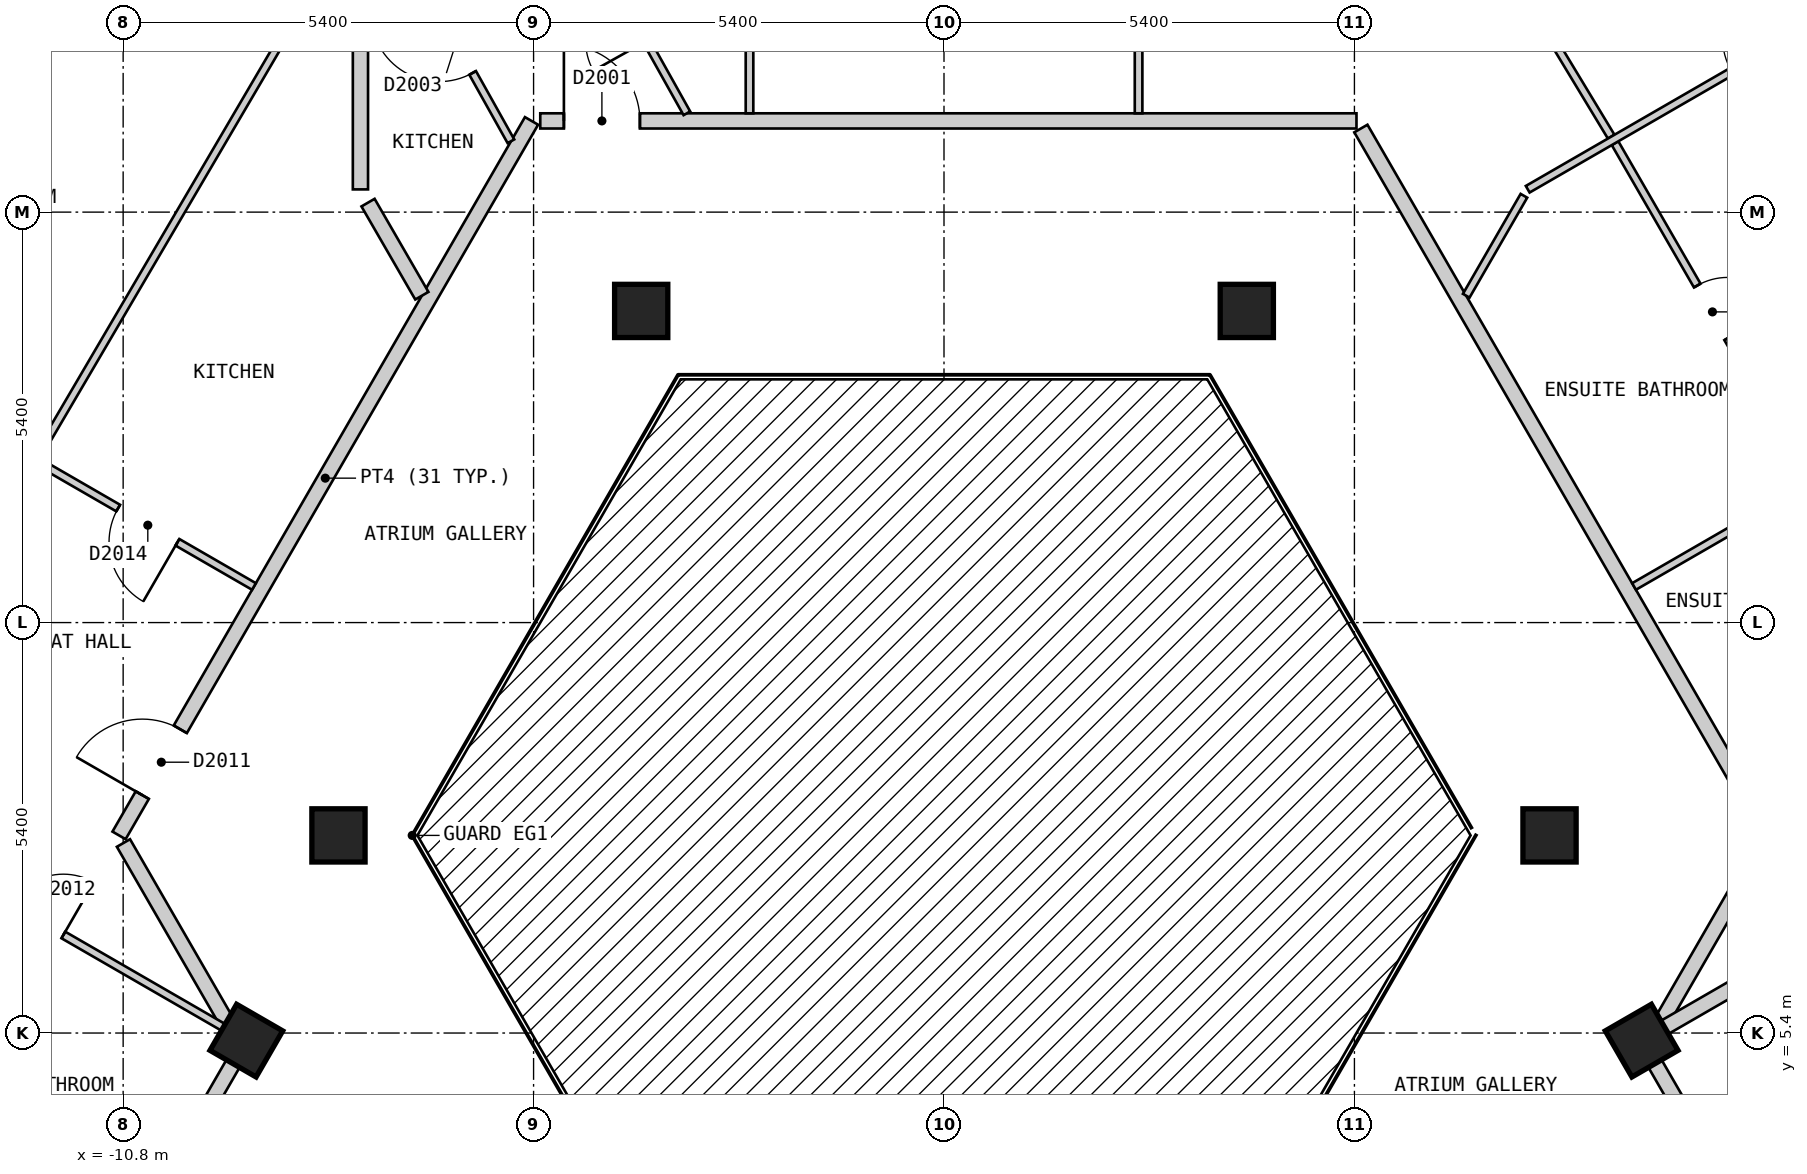
"""IFC4 building model, lengths in metres.
Left out: names, types, materials, properties, quantities, classifications, styles, units other than length and angle.
Written with IfcOpenShell. Run it as: python <this file> out.ifc"""

import sys

from ifc_helpers import new_model, si_unit, direction, frame, frame_2d, origin, origin_2d, place, context, subcontext, project, spatial, rectangle, extrude, element, fill, save


model = new_model("IFC4")
c1 = context("Model", 3, precision=1e-05, world=origin(), true_north=direction((0.0, 1.0)))
c2 = subcontext(c1, "Body", "Model", "MODEL_VIEW")
j1 = project(units=[si_unit("LENGTHUNIT", "METRE"), si_unit("PLANEANGLEUNIT", "RADIAN")], contexts=[c1])
p1 = place(None, origin())
s1 = spatial("IfcSite", under=j1, at=p1, CompositionType="ELEMENT")
p2 = place(p1, origin())
s2 = spatial("IfcBuilding", under=s1, at=p2, CompositionType="ELEMENT")
p3 = place(p2, frame((0.0, 0.0, 238.8)))
s3 = spatial("IfcBuildingStorey", under=s2, at=p3, CompositionType="ELEMENT", Elevation=238.8)
for number, where, z_axis, x_axis in (
    (1, (9.179, 5.3, 0.0), (0.0, 0.0, 1.0), (-0.5, 0.866, 0.0)),
    (2, (7.967, 8.0, 0.0), (0.0, 0.0, 1.0), (1.0, 0.0, 0.0)),
    (3, (3.984, 14.9, 0.0), (0.0, 0.0, 1.0), (1.0, 0.0, 0.0)),
    (4, (-3.984, 14.9, 0.0), (0.0, 0.0, 1.0), (1.0, 0.0, 0.0)),
    (5, (-7.967, 8.0, 0.0), (0.0, 0.0, 1.0), (1.0, 0.0, 0.0)),
    (6, (-9.179, 5.3, 0.0), (0.0, 0.0, 1.0), (-0.5, -0.866, 0.0)),
):
    element("IfcColumn", number, at=place(p3, frame(where, z_axis=z_axis, x_axis=x_axis)), inside=s3, PredefinedType="COLUMN", context=c2, shape_type="SweptSolid", body=[
        extrude(rectangle(XDim=0.7, YDim=0.7, at=origin_2d()), origin(), (0.0, 0.0, 1.0), 3.0),
    ])
p4 = place(p3, frame((-10.796, 7.9, 0.0), z_axis=(0.0, 0.0, 1.0), x_axis=(0.499797758538, -0.866142136465, 0.0)))
e7 = element("IfcWall", 7, at=p4, inside=s3, PredefinedType="PARTITIONING", context=c2, shape_type="SweptSolid", body=[
    extrude(rectangle(XDim=2.713, YDim=0.2, at=frame_2d((1.356, 0.0))), origin(), (0.0, 0.0, 1.0), 2.7),
])
p5 = place(p3, frame((9.238, 5.2, 0.0), z_axis=(0.0, 0.0, 1.0), x_axis=(0.500025705601, -0.86601056214, 0.0)))
e8 = element("IfcWall", 8, at=p5, inside=s3, PredefinedType="PARTITIONING", context=c2, shape_type="SweptSolid", body=[
    extrude(rectangle(XDim=7.735, YDim=0.2, at=frame_2d((3.868, 0.0))), origin(), (0.0, 0.0, 1.0), 2.7),
])
p6 = place(p5, frame((6.705, 0.0, 0.0)))
e9 = element("IfcOpeningElement", 9, at=p6, cuts=e8, PredefinedType="OPENING", context=c2, shape_type="SweptSolid", body=[
    extrude(rectangle(XDim=1.0, YDim=2.1, at=frame_2d((0.5, 1.05))), frame((0.0, 0.11, 0.0), z_axis=(0.0, -1.0, 0.0), x_axis=(1.0, 0.0, 0.0)), (0.0, 0.0, 1.0), 0.22),
])
p7 = place(p5, frame((1.988, 0.0, 0.0)))
e10 = element("IfcOpeningElement", 10, at=p7, cuts=e8, PredefinedType="OPENING", context=c2, shape_type="SweptSolid", body=[
    extrude(rectangle(XDim=1.0, YDim=2.1, at=frame_2d((0.5, 1.05))), frame((0.0, 0.11, 0.0), z_axis=(0.0, -1.0, 0.0), x_axis=(1.0, 0.0, 0.0)), (0.0, 0.0, 1.0), 0.22),
])
p8 = place(p3, frame((5.485, 17.3, 0.0), z_axis=(0.0, 0.0, 1.0), x_axis=(0.499943285704, -0.866058145322, 0.0)))
e11 = element("IfcWall", 11, at=p8, inside=s3, PredefinedType="PARTITIONING", context=c2, shape_type="SweptSolid", body=[
    extrude(rectangle(XDim=10.623, YDim=0.2, at=frame_2d((5.312, 0.0))), origin(), (0.0, 0.0, 1.0), 2.7),
])
p9 = place(p3, frame((-5.312, 17.4, 0.0), z_axis=(0.0, 0.0, 1.0), x_axis=(1.0, 0.0, 0.0)))
e12 = element("IfcWall", 12, at=p9, inside=s3, PredefinedType="PARTITIONING", context=c2, shape_type="SweptSolid", body=[
    extrude(rectangle(XDim=10.739, YDim=0.2, at=frame_2d((5.37, 0.0))), origin(), (0.0, 0.0, 1.0), 2.7),
])
p10 = place(p9, frame((0.311, 0.0, 0.0)))
e13 = element("IfcOpeningElement", 13, at=p10, cuts=e12, PredefinedType="OPENING", context=c2, shape_type="SweptSolid", body=[
    extrude(rectangle(XDim=1.0, YDim=2.1, at=frame_2d((0.5, 1.05))), frame((0.0, 0.11, 0.0), z_axis=(0.0, -1.0, 0.0), x_axis=(1.0, 0.0, 0.0)), (0.0, 0.0, 1.0), 0.22),
])
p11 = place(p3, frame((9.454, 5.574, 0.0), z_axis=(0.0, 0.0, 1.0), x_axis=(0.499795394297, 0.86614350072, 0.0)))
e14 = element("IfcWall", 14, at=p11, inside=s3, PredefinedType="PARTITIONING", context=c2, shape_type="SweptSolid", body=[
    extrude(rectangle(XDim=2.801, YDim=0.2, at=frame_2d((1.4, 0.0))), origin(), (0.0, 0.0, 1.0), 2.7),
])
p12 = place(p3, frame((-13.106, -1.5, 0.0), z_axis=(0.0, 0.0, 1.0), x_axis=(0.500025705601, 0.86601056214, 0.0)))
e15 = element("IfcWall", 15, at=p12, inside=s3, PredefinedType="PARTITIONING", context=c2, shape_type="SweptSolid", body=[
    extrude(rectangle(XDim=7.735, YDim=0.2, at=frame_2d((3.868, 0.0))), origin(), (0.0, 0.0, 1.0), 2.7),
])
p13 = place(p3, frame((-10.854, 8.0, 0.0), z_axis=(0.0, 0.0, 1.0), x_axis=(0.499997637144, 0.866026767976, 0.0)))
e16 = element("IfcWall", 16, at=p13, inside=s3, PredefinedType="PARTITIONING", context=c2, shape_type="SweptSolid", body=[
    extrude(rectangle(XDim=10.854, YDim=0.2, at=frame_2d((5.427, 0.0))), origin(), (0.0, 0.0, 1.0), 2.7),
])
p14 = place(p13, frame((0.612, 0.0, 0.0)))
e17 = element("IfcOpeningElement", 17, at=p14, cuts=e16, PredefinedType="OPENING", context=c2, shape_type="SweptSolid", body=[
    extrude(rectangle(XDim=1.0, YDim=2.1, at=frame_2d((0.5, 1.05))), frame((0.0, 0.11, 0.0), z_axis=(0.0, -1.0, 0.0), x_axis=(1.0, 0.0, 0.0)), (0.0, 0.0, 1.0), 0.22),
])
p15 = place(p3, frame((7.033, 20.078, 0.0), z_axis=(0.0, 0.0, 1.0), x_axis=(0.517601834362, -0.855621610915, 0.0)))
e18 = element("IfcWall", 18, at=p15, inside=s3, PredefinedType="PARTITIONING", context=c2, shape_type="SweptSolid", body=[
    extrude(rectangle(XDim=3.372, YDim=0.1, at=frame_2d((1.686, 0.0))), origin(), (0.0, 0.0, 1.0), 2.7),
])
p16 = place(p3, frame((8.829, 17.107, 0.0), z_axis=(0.0, 0.0, 1.0), x_axis=(0.500022055211, -0.866012669828, 0.0)))
e19 = element("IfcWall", 19, at=p16, inside=s3, PredefinedType="PARTITIONING", context=c2, shape_type="SweptSolid", body=[
    extrude(rectangle(XDim=5.126, YDim=0.1, at=frame_2d((2.563, 0.0))), origin(), (0.0, 0.0, 1.0), 2.7),
])
p17 = place(p16, frame((2.163, 0.0, 0.0)))
e20 = element("IfcOpeningElement", 20, at=p17, cuts=e19, PredefinedType="OPENING", context=c2, shape_type="SweptSolid", body=[
    extrude(rectangle(XDim=0.8, YDim=2.1, at=frame_2d((0.4, 1.05))), frame((0.0, 0.06, 0.0), z_axis=(0.0, -1.0, 0.0), x_axis=(1.0, 0.0, 0.0)), (0.0, 0.0, 1.0), 0.12),
])
p18 = place(p3, frame((-7.174, 19.769, 0.0), z_axis=(0.0, 0.0, 1.0), x_axis=(0.488445917321, -0.872594170192, 0.0)))
e21 = element("IfcWall", 21, at=p18, inside=s3, PredefinedType="PARTITIONING", context=c2, shape_type="SweptSolid", body=[
    extrude(rectangle(XDim=3.022, YDim=0.1, at=frame_2d((1.511, 0.0))), origin(), (0.0, 0.0, 1.0), 2.7),
])
p19 = place(p18, frame((1.091, 0.0, 0.0)))
e22 = element("IfcOpeningElement", 22, at=p19, cuts=e21, PredefinedType="OPENING", context=c2, shape_type="SweptSolid", body=[
    extrude(rectangle(XDim=0.9, YDim=2.1, at=frame_2d((0.45, 1.05))), frame((0.0, 0.06, 0.0), z_axis=(0.0, -1.0, 0.0), x_axis=(1.0, 0.0, 0.0)), (0.0, 0.0, 1.0), 0.12),
])
p20 = place(p3, frame((-4.866, 20.15, 0.0), z_axis=(0.0, 0.0, 1.0), x_axis=(0.488343837593, -0.872651302804, 0.0)))
e23 = element("IfcWall", 23, at=p20, inside=s3, PredefinedType="PARTITIONING", context=c2, shape_type="SweptSolid", body=[
    extrude(rectangle(XDim=3.037, YDim=0.1, at=frame_2d((1.518, 0.0))), origin(), (0.0, 0.0, 1.0), 2.7),
])
p21 = place(p20, frame((1.147, 0.0, 0.0)))
e24 = element("IfcOpeningElement", 24, at=p21, cuts=e23, PredefinedType="OPENING", context=c2, shape_type="SweptSolid", body=[
    extrude(rectangle(XDim=0.8, YDim=2.1, at=frame_2d((0.4, 1.05))), frame((0.0, 0.06, 0.0), z_axis=(0.0, -1.0, 0.0), x_axis=(1.0, 0.0, 0.0)), (0.0, 0.0, 1.0), 0.12),
])
p22 = place(p3, frame((-17.926, 10.35, 0.0), z_axis=(0.0, 0.0, 1.0), x_axis=(0.866018411306, -0.500012111133, 0.0)))
e25 = element("IfcWall", 25, at=p22, inside=s3, PredefinedType="PARTITIONING", context=c2, shape_type="SweptSolid", body=[
    extrude(rectangle(XDim=9.898, YDim=0.1, at=frame_2d((4.949, 0.0))), origin(), (0.0, 0.0, 1.0), 2.7),
])
p23 = place(p22, frame((6.52, 0.0, 0.0)))
e26 = element("IfcOpeningElement", 26, at=p23, cuts=e25, PredefinedType="OPENING", context=c2, shape_type="SweptSolid", body=[
    extrude(rectangle(XDim=0.8, YDim=2.1, at=frame_2d((0.4, 1.05))), frame((0.0, 0.06, 0.0), z_axis=(0.0, -1.0, 0.0), x_axis=(1.0, 0.0, 0.0)), (0.0, 0.0, 1.0), 0.12),
])
p24 = place(p22, frame((1.521, 0.0, 0.0)))
e27 = element("IfcOpeningElement", 27, at=p24, cuts=e25, PredefinedType="OPENING", context=c2, shape_type="SweptSolid", body=[
    extrude(rectangle(XDim=0.9, YDim=2.1, at=frame_2d((0.45, 1.05))), frame((0.0, 0.06, 0.0), z_axis=(0.0, -1.0, 0.0), x_axis=(1.0, 0.0, 0.0)), (0.0, 0.0, 1.0), 0.12),
])
p25 = place(p3, frame((-15.314, 14.875, 0.0), z_axis=(0.0, 0.0, 1.0), x_axis=(0.866001485781, -0.500041424909, 0.0)))
e28 = element("IfcWall", 28, at=p25, inside=s3, PredefinedType="PARTITIONING", context=c2, shape_type="SweptSolid", body=[
    extrude(rectangle(XDim=7.2, YDim=0.1, at=frame_2d((3.6, 0.0))), origin(), (0.0, 0.0, 1.0), 2.7),
])
p26 = place(p25, frame((5.137, 0.0, 0.0)))
e29 = element("IfcOpeningElement", 29, at=p26, cuts=e28, PredefinedType="OPENING", context=c2, shape_type="SweptSolid", body=[
    extrude(rectangle(XDim=0.9, YDim=2.1, at=frame_2d((0.45, 1.05))), frame((0.0, 0.06, 0.0), z_axis=(0.0, -1.0, 0.0), x_axis=(1.0, 0.0, 0.0)), (0.0, 0.0, 1.0), 0.12),
])
p27 = place(p25, frame((1.487, 0.0, 0.0)))
e30 = element("IfcOpeningElement", 30, at=p27, cuts=e28, PredefinedType="OPENING", context=c2, shape_type="SweptSolid", body=[
    extrude(rectangle(XDim=0.9, YDim=2.1, at=frame_2d((0.45, 1.05))), frame((0.0, 0.06, 0.0), z_axis=(0.0, -1.0, 0.0), x_axis=(1.0, 0.0, 0.0)), (0.0, 0.0, 1.0), 0.12),
])
p28 = place(p3, frame((-11.934, 12.981, 0.0), z_axis=(0.0, 0.0, 1.0), x_axis=(0.506072703404, 0.862490822484, 0.0)))
e31 = element("IfcWall", 31, at=p28, inside=s3, PredefinedType="PARTITIONING", context=c2, shape_type="SweptSolid", body=[
    extrude(rectangle(XDim=8.212, YDim=0.1, at=frame_2d((4.106, 0.0))), origin(), (0.0, 0.0, 1.0), 2.7),
])
p29 = place(p3, frame((6.871, 15.1, 0.0), z_axis=(0.0, 0.0, 1.0), x_axis=(0.499805980977, 0.866137391745, 0.0)))
e32 = element("IfcWall", 32, at=p29, inside=s3, PredefinedType="PARTITIONING", context=c2, shape_type="SweptSolid", body=[
    extrude(rectangle(XDim=1.518, YDim=0.1, at=frame_2d((0.759, 0.0))), origin(), (0.0, 0.0, 1.0), 2.7),
])
p30 = place(p3, frame((2.56, 17.5, 0.0), z_axis=(0.0, 0.0, 1.0), x_axis=(0.0, 1.0, 0.0)))
e33 = element("IfcWall", 33, at=p30, inside=s3, PredefinedType="PARTITIONING", context=c2, shape_type="SweptSolid", body=[
    extrude(rectangle(XDim=4.8, YDim=0.1, at=frame_2d((2.4, 0.0))), origin(), (0.0, 0.0, 1.0), 2.7),
])
p31 = place(p30, frame((2.8, 0.0, 0.0)))
e34 = element("IfcOpeningElement", 34, at=p31, cuts=e33, PredefinedType="OPENING", context=c2, shape_type="SweptSolid", body=[
    extrude(rectangle(XDim=0.7, YDim=2.1, at=frame_2d((0.35, 1.05))), frame((0.0, 0.06, 0.0), z_axis=(0.0, -1.0, 0.0), x_axis=(1.0, 0.0, 0.0)), (0.0, 0.0, 1.0), 0.12),
])
p32 = place(p3, frame((-2.559, 17.5, 0.0), z_axis=(0.0, 0.0, 1.0), x_axis=(0.0, 1.0, 0.0)))
e35 = element("IfcWall", 35, at=p32, inside=s3, PredefinedType="PARTITIONING", context=c2, shape_type="SweptSolid", body=[
    extrude(rectangle(XDim=2.7, YDim=0.1, at=frame_2d((1.35, 0.0))), origin(), (0.0, 0.0, 1.0), 2.7),
])
p33 = place(p3, frame((10.178, 3.772, 0.0), z_axis=(0.0, 0.0, 1.0), x_axis=(0.889829844516, 0.456292502467, 0.0)))
e36 = element("IfcWall", 36, at=p33, inside=s3, PredefinedType="PARTITIONING", context=c2, shape_type="SweptSolid", body=[
    extrude(rectangle(XDim=3.079, YDim=0.1, at=frame_2d((1.54, 0.0))), origin(), (0.0, 0.0, 1.0), 2.7),
])
p34 = place(p33, frame((1.115, 0.0, 0.0)))
e37 = element("IfcOpeningElement", 37, at=p34, cuts=e36, PredefinedType="OPENING", context=c2, shape_type="SweptSolid", body=[
    extrude(rectangle(XDim=0.8, YDim=2.1, at=frame_2d((0.4, 1.05))), frame((0.0, 0.06, 0.0), z_axis=(0.0, -1.0, 0.0), x_axis=(1.0, 0.0, 0.0)), (0.0, 0.0, 1.0), 0.12),
])
p35 = place(p3, frame((9.457, 5.461, 0.0), z_axis=(0.0, 0.0, 1.0), x_axis=(0.889888641814, 0.456177821874, 0.0)))
e38 = element("IfcWall", 38, at=p35, inside=s3, PredefinedType="PARTITIONING", context=c2, shape_type="SweptSolid", body=[
    extrude(rectangle(XDim=2.999, YDim=0.1, at=frame_2d((1.5, 0.0))), origin(), (0.0, 0.0, 1.0), 2.7),
])
p36 = place(p3, frame((9.079, 11.275, 0.0), z_axis=(0.0, 0.0, 1.0), x_axis=(0.866001485781, 0.500041424909, 0.0)))
e39 = element("IfcWall", 39, at=p36, inside=s3, PredefinedType="PARTITIONING", context=c2, shape_type="SweptSolid", body=[
    extrude(rectangle(XDim=7.2, YDim=0.1, at=frame_2d((3.6, 0.0))), origin(), (0.0, 0.0, 1.0), 2.7),
])
p37 = place(p36, frame((4.5, 0.0, 0.0)))
e40 = element("IfcOpeningElement", 40, at=p37, cuts=e39, PredefinedType="OPENING", context=c2, shape_type="SweptSolid", body=[
    extrude(rectangle(XDim=0.9, YDim=2.1, at=frame_2d((0.45, 1.05))), frame((0.0, 0.06, 0.0), z_axis=(0.0, -1.0, 0.0), x_axis=(1.0, 0.0, 0.0)), (0.0, 0.0, 1.0), 0.12),
])
p38 = place(p3, frame((7.68, 16.501, 0.0), z_axis=(0.0, 0.0, 1.0), x_axis=(0.86602149507, 0.500006770031, 0.0)))
e41 = element("IfcWall", 41, at=p38, inside=s3, PredefinedType="PARTITIONING", context=c2, shape_type="SweptSolid", body=[
    extrude(rectangle(XDim=5.798, YDim=0.1, at=frame_2d((2.899, 0.0))), origin(), (0.0, 0.0, 1.0), 2.7),
])
p39 = place(p38, frame((3.098, 0.0, 0.0)))
e42 = element("IfcOpeningElement", 42, at=p39, cuts=e41, PredefinedType="OPENING", context=c2, shape_type="SweptSolid", body=[
    extrude(rectangle(XDim=0.9, YDim=2.1, at=frame_2d((0.45, 1.05))), frame((0.0, 0.06, 0.0), z_axis=(0.0, -1.0, 0.0), x_axis=(1.0, 0.0, 0.0)), (0.0, 0.0, 1.0), 0.12),
])
p40 = place(p3, frame((-7.578, 16.325, 0.0), z_axis=(0.0, 0.0, 1.0), x_axis=(0.500314976313, -0.865843475737, 0.0)))
e43 = element("IfcWall", 43, at=p40, inside=s3, PredefinedType="PARTITIONING", context=c2, shape_type="SweptSolid", body=[
    extrude(rectangle(XDim=1.415, YDim=0.2, at=frame_2d((0.707, 0.0))), origin(), (0.0, 0.0, 1.0), 2.7),
])
p41 = place(p3, frame((-7.678, 16.499, 0.0), z_axis=(0.0, 0.0, 1.0), x_axis=(0.0, 1.0, 0.0)))
e44 = element("IfcWall", 44, at=p41, inside=s3, PredefinedType="PARTITIONING", context=c2, shape_type="SweptSolid", body=[
    extrude(rectangle(XDim=5.801, YDim=0.2, at=frame_2d((2.9, 0.0))), origin(), (0.0, 0.0, 1.0), 2.7),
])
p42 = place(p3, frame((9.354, 5.401, 0.0), z_axis=(0.0, 0.0, 1.0), x_axis=(0.866018411306, 0.500012111133, 0.0)))
e45 = element("IfcWall", 45, at=p42, inside=s3, PredefinedType="PARTITIONING", context=c2, shape_type="SweptSolid", body=[
    extrude(rectangle(XDim=9.898, YDim=0.2, at=frame_2d((4.949, 0.0))), origin(), (0.0, 0.0, 1.0), 2.7),
])
p43 = place(p10, origin())
e46 = element("IfcDoor", 46, at=p43, inside=s3, OperationType="SINGLE_SWING_LEFT", PredefinedType="DOOR", context=c2, shape_type="SweptSolid", body=[
    extrude(rectangle(XDim=1.0, YDim=2.1, at=frame_2d((0.5, 1.05))), frame((0.0, 0.025, 0.0), z_axis=(0.0, -1.0, 0.0), x_axis=(1.0, 0.0, 0.0)), (0.0, 0.0, 1.0), 0.05),
])
fill(e13, e46)
p44 = place(p19, origin())
e47 = element("IfcDoor", 47, at=p44, inside=s3, OperationType="SINGLE_SWING_LEFT", PredefinedType="DOOR", context=c2, shape_type="SweptSolid", body=[
    extrude(rectangle(XDim=0.9, YDim=2.1, at=frame_2d((0.45, 1.05))), frame((0.0, 0.025, 0.0), z_axis=(0.0, -1.0, 0.0), x_axis=(1.0, 0.0, 0.0)), (0.0, 0.0, 1.0), 0.05),
])
fill(e22, e47)
p45 = place(p17, origin())
e48 = element("IfcDoor", 48, at=p45, inside=s3, OperationType="SINGLE_SWING_RIGHT", PredefinedType="DOOR", context=c2, shape_type="SweptSolid", body=[
    extrude(rectangle(XDim=0.8, YDim=2.1, at=frame_2d((0.4, 1.05))), frame((0.0, 0.025, 0.0), z_axis=(0.0, -1.0, 0.0), x_axis=(1.0, 0.0, 0.0)), (0.0, 0.0, 1.0), 0.05),
])
fill(e20, e48)
p46 = place(p14, origin())
e49 = element("IfcDoor", 49, at=p46, inside=s3, OperationType="SINGLE_SWING_LEFT", PredefinedType="DOOR", context=c2, shape_type="SweptSolid", body=[
    extrude(rectangle(XDim=1.0, YDim=2.1, at=frame_2d((0.5, 1.05))), frame((0.0, 0.025, 0.0), z_axis=(0.0, -1.0, 0.0), x_axis=(1.0, 0.0, 0.0)), (0.0, 0.0, 1.0), 0.05),
])
fill(e17, e49)
p47 = place(p23, origin())
e50 = element("IfcDoor", 50, at=p47, inside=s3, OperationType="SINGLE_SWING_RIGHT", PredefinedType="DOOR", context=c2, shape_type="SweptSolid", body=[
    extrude(rectangle(XDim=0.8, YDim=2.1, at=frame_2d((0.4, 1.05))), frame((0.0, 0.025, 0.0), z_axis=(0.0, -1.0, 0.0), x_axis=(1.0, 0.0, 0.0)), (0.0, 0.0, 1.0), 0.05),
])
fill(e26, e50)
p48 = place(p26, origin())
e51 = element("IfcDoor", 51, at=p48, inside=s3, OperationType="SINGLE_SWING_RIGHT", PredefinedType="DOOR", context=c2, shape_type="SweptSolid", body=[
    extrude(rectangle(XDim=0.9, YDim=2.1, at=frame_2d((0.45, 1.05))), frame((0.0, 0.025, 0.0), z_axis=(0.0, -1.0, 0.0), x_axis=(1.0, 0.0, 0.0)), (0.0, 0.0, 1.0), 0.05),
])
fill(e29, e51)
save(model, sys.argv[1])
